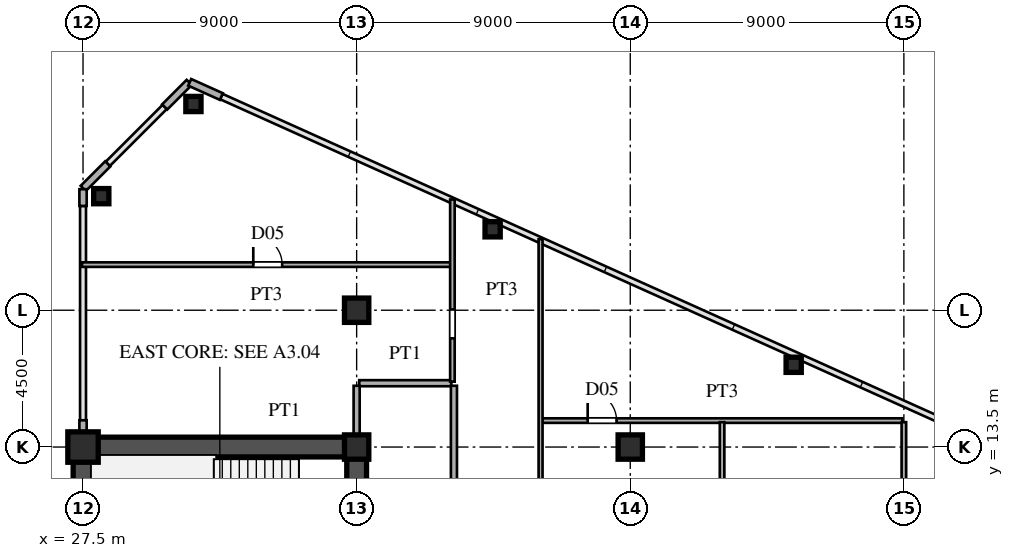
"""IFC4 building model, lengths in metres.
Left out: names, types, materials, properties, quantities, classifications, styles, units other than length and angle.
Written with IfcOpenShell. Run it as: python <this file> out.ifc"""

import sys

from ifc_helpers import new_model, si_unit, direction, frame, frame_2d, origin, origin_2d, place, context, subcontext, project, spatial, rectangle, hollow_rectangle, i_section, extrude, source, transform, mapped, element, fill, save


model = new_model("IFC4")
c1 = context("Model", 3, precision=1e-05, world=origin(), true_north=direction((0.0, 1.0)))
c2 = subcontext(c1, "Body", "Model", "MODEL_VIEW")
j1 = project(units=[si_unit("LENGTHUNIT", "METRE"), si_unit("PLANEANGLEUNIT", "RADIAN")], contexts=[c1])
p1 = place(None, origin())
s1 = spatial("IfcSite", under=j1, at=p1, CompositionType="ELEMENT")
p2 = place(p1, origin())
s2 = spatial("IfcBuilding", under=s1, at=p2, CompositionType="ELEMENT")
p3 = place(p2, frame((0.0, 0.0, 65.7)))
s3 = spatial("IfcBuildingStorey", under=s2, at=p3, CompositionType="ELEMENT", Elevation=65.7)
m1 = source(origin(), c2, "Body", "SweptSolid", [
    extrude(hollow_rectangle(XDim=1.0, YDim=1.0, WallThickness=0.042, at=origin_2d()), origin(), (0.0, 0.0, 1.0), 3.6),
])
p4 = place(p3, frame((27.5, 13.5, 0.0), z_axis=(0.0, 0.0, 1.0), x_axis=(1.0, 0.0, 0.0)))
e1 = element("IfcColumn", 1, at=p4, inside=s3, PredefinedType="COLUMN", context=c2, shape_type="MappedRepresentation", body=[
    mapped(m1, transform((0.0, 0.0, 0.0), scale=1.0)),
])
m2 = source(origin(), c2, "Body", "SweptSolid", [
    extrude(i_section(OverallWidth=0.8, OverallDepth=0.8, WebThickness=0.032, FlangeThickness=0.05, at=origin_2d()), origin(), (0.0, 0.0, 1.0), 3.6),
])
for number, where, z_axis, x_axis in (
    (2, (36.5, 13.5, 0.0), (0.0, 0.0, 1.0), (1.0, 0.0, 0.0)),
    (3, (36.5, 18.0, 0.0), (0.0, 0.0, 1.0), (1.0, 0.0, 0.0)),
    (4, (45.5, 13.5, 0.0), (0.0, 0.0, 1.0), (1.0, 0.0, 0.0)),
):
    element("IfcColumn", number, at=place(p3, frame(where, z_axis=z_axis, x_axis=x_axis)), inside=s3, PredefinedType="COLUMN", context=c2, shape_type="MappedRepresentation", body=[
        mapped(m2, transform((0.0, 0.0, 0.0), scale=1.0)),
    ])
m3 = source(origin(), c2, "Body", "SweptSolid", [
    extrude(hollow_rectangle(XDim=0.5, YDim=0.5, WallThickness=0.02, at=origin_2d()), origin(), (0.0, 0.0, 1.0), 3.6),
])
for number, where, z_axis, x_axis in (
    (5, (31.131, 24.783, 0.0), (0.0, 0.0, 1.0), (1.0, 0.0, 0.0)),
    (6, (28.1, 21.751, 0.0), (0.0, 0.0, 1.0), (1.0, 0.0, 0.0)),
    (7, (40.973, 20.661, 0.0), (0.0, 0.0, 1.0), (1.0, 0.0, 0.0)),
    (8, (50.875, 16.205, 0.0), (0.0, 0.0, 1.0), (1.0, 0.0, 0.0)),
):
    element("IfcColumn", number, at=place(p3, frame(where, z_axis=z_axis, x_axis=x_axis)), inside=s3, PredefinedType="COLUMN", context=c2, shape_type="MappedRepresentation", body=[
        mapped(m3, transform((0.0, 0.0, 0.0), scale=1.0)),
    ])
p5 = place(p3, frame((32.049, 25.028, 0.0), z_axis=(0.0, 0.0, 1.0), x_axis=(-0.911929519623, 0.410346866979, 0.0)))
e9 = element("IfcWall", 9, at=p5, inside=s3, PredefinedType="SOLIDWALL", context=c2, shape_type="SweptSolid", body=[
    extrude(rectangle(XDim=1.14, YDim=0.24, at=frame_2d((0.57, 0.0))), origin(), (0.0, 0.0, 1.0), 3.38),
])
for number, where, z_axis, x_axis in (
    (10, (30.993, 25.493, 0.0), (0.0, 0.0, 1.0), (-0.707, -0.707, 0.0)),
    (11, (28.313, 22.813, 0.0), (0.0, 0.0, 1.0), (-0.707, -0.707, 0.0)),
):
    element("IfcWall", number, at=place(p3, frame(where, z_axis=z_axis, x_axis=x_axis)), inside=s3, PredefinedType="SOLIDWALL", context=c2, shape_type="SweptSolid", body=[
        extrude(rectangle(XDim=1.14, YDim=0.24, at=frame_2d((0.57, 0.0))), origin(), (0.0, 0.0, 1.0), 3.38),
    ])
p6 = place(p3, frame((27.5, 13.83, 0.0), z_axis=(0.0, 0.0, 1.0), x_axis=(0.0, 1.0, 0.0)))
e12 = element("IfcWall", 12, at=p6, inside=s3, PredefinedType="SOLIDWALL", context=c2, shape_type="SweptSolid", body=[
    extrude(rectangle(XDim=0.55, YDim=0.24, at=frame_2d((0.275, 0.0))), origin(), (0.0, 0.0, 1.0), 2.88),
])
p7 = place(p3, frame((27.5, 21.43, 0.0), z_axis=(0.0, 0.0, 1.0), x_axis=(0.0, 1.0, 0.0)))
e13 = element("IfcWall", 13, at=p7, inside=s3, PredefinedType="SOLIDWALL", context=c2, shape_type="SweptSolid", body=[
    extrude(rectangle(XDim=0.55, YDim=0.24, at=frame_2d((0.275, 0.0))), origin(), (0.0, 0.0, 1.0), 3.38),
])
p8 = place(p3, frame((27.5, 1.3, 0.0), z_axis=(0.0, 0.0, 1.0), x_axis=(0.0, 1.0, 0.0)))
e14 = element("IfcWall", 14, at=p8, inside=s3, PredefinedType="SHEAR", context=c2, shape_type="SweptSolid", body=[
    extrude(rectangle(XDim=12.2, YDim=0.65, at=frame_2d((6.1, 0.0))), origin(), (0.0, 0.0, 1.0), 3.38),
])
p9 = place(p3, frame((27.5, 13.5, 0.0), z_axis=(0.0, 0.0, 1.0), x_axis=(1.0, 0.0, 0.0)))
e15 = element("IfcWall", 15, at=p9, inside=s3, PredefinedType="SHEAR", context=c2, shape_type="SweptSolid", body=[
    extrude(rectangle(XDim=9.0, YDim=0.65, at=frame_2d((4.5, 0.0))), origin(), (0.0, 0.0, 1.0), 3.38),
])
p10 = place(p3, frame((36.5, 8.2, 0.0), z_axis=(0.0, 0.0, 1.0), x_axis=(0.0, 1.0, 0.0)))
e16 = element("IfcWall", 16, at=p10, inside=s3, PredefinedType="SHEAR", context=c2, shape_type="SweptSolid", body=[
    extrude(rectangle(XDim=5.45, YDim=0.65, at=frame_2d((2.725, 0.0))), origin(), (0.0, 0.0, 1.0), 3.38),
])
p11 = place(p10, frame((0.245, 0.0, 0.0)))
e17 = element("IfcOpeningElement", 17, at=p11, cuts=e16, PredefinedType="OPENING", context=c2, shape_type="SweptSolid", body=[
    extrude(rectangle(XDim=0.95, YDim=2.15, at=frame_2d((0.475, 1.075))), frame((0.0, 0.335, 0.0), z_axis=(0.0, -1.0, 0.0), x_axis=(1.0, 0.0, 0.0)), (0.0, 0.0, 1.0), 0.67),
])
p12 = place(p3, frame((42.6, 14.37, 0.0), z_axis=(0.0, 0.0, 1.0), x_axis=(1.0, 0.0, 0.0)))
e18 = element("IfcWall", 18, at=p12, inside=s3, PredefinedType="PARTITIONING", context=c2, shape_type="SweptSolid", body=[
    extrude(rectangle(XDim=11.85, YDim=0.15, at=frame_2d((5.925, 0.0))), origin(), (0.0, 0.0, 1.0), 3.38),
])
p13 = place(p12, frame((1.5, 0.0, 0.0)))
e19 = element("IfcOpeningElement", 19, at=p13, cuts=e18, PredefinedType="OPENING", context=c2, shape_type="SweptSolid", body=[
    extrude(rectangle(XDim=0.95, YDim=2.15, at=frame_2d((0.475, 1.075))), frame((0.0, 0.085, 0.0), z_axis=(0.0, -1.0, 0.0), x_axis=(1.0, 0.0, 0.0)), (0.0, 0.0, 1.0), 0.17),
])
p14 = place(p3, frame((36.585, 15.6, 0.0), z_axis=(0.0, 0.0, 1.0), x_axis=(1.0, 0.0, 0.0)))
e20 = element("IfcWall", 20, at=p14, inside=s3, PredefinedType="PARTITIONING", context=c2, shape_type="SweptSolid", body=[
    extrude(rectangle(XDim=3.03, YDim=0.2, at=frame_2d((1.515, 0.0))), origin(), (0.0, 0.0, 1.0), 3.38),
])
p15 = place(p3, frame((27.465, 19.5, 0.0), z_axis=(0.0, 0.0, 1.0), x_axis=(1.0, 0.0, 0.0)))
e21 = element("IfcWall", 21, at=p15, inside=s3, PredefinedType="PARTITIONING", context=c2, shape_type="SweptSolid", body=[
    extrude(rectangle(XDim=12.135, YDim=0.15, at=frame_2d((6.067, 0.0))), origin(), (0.0, 0.0, 1.0), 3.38),
])
p16 = place(p15, frame((5.635, 0.0, 0.0)))
e22 = element("IfcOpeningElement", 22, at=p16, cuts=e21, PredefinedType="OPENING", context=c2, shape_type="SweptSolid", body=[
    extrude(rectangle(XDim=0.95, YDim=2.15, at=frame_2d((0.475, 1.075))), frame((0.0, 0.085, 0.0), z_axis=(0.0, -1.0, 0.0), x_axis=(1.0, 0.0, 0.0)), (0.0, 0.0, 1.0), 0.17),
])
p17 = place(p3, frame((36.5, 13.83, 0.0), z_axis=(0.0, 0.0, 1.0), x_axis=(0.0, 1.0, 0.0)))
e23 = element("IfcWall", 23, at=p17, inside=s3, PredefinedType="PARTITIONING", context=c2, shape_type="SweptSolid", body=[
    extrude(rectangle(XDim=1.685, YDim=0.2, at=frame_2d((0.842, 0.0))), origin(), (0.0, 0.0, 1.0), 2.68),
])
p18 = place(p3, frame((39.65, 15.65, 0.0), z_axis=(0.0, 0.0, 1.0), x_axis=(0.0, 1.0, 0.0)))
e24 = element("IfcWall", 24, at=p18, inside=s3, PredefinedType="PARTITIONING", context=c2, shape_type="SweptSolid", body=[
    extrude(rectangle(XDim=5.992, YDim=0.15, at=frame_2d((2.996, 0.0))), origin(), (0.0, 0.0, 1.0), 3.38),
])
p19 = place(p18, frame((1.425, 0.0, 0.0)))
e25 = element("IfcOpeningElement", 25, at=p19, cuts=e24, PredefinedType="OPENING", context=c2, shape_type="SweptSolid", body=[
    extrude(rectangle(XDim=0.95, YDim=2.15, at=frame_2d((0.475, 1.075))), frame((0.0, 0.085, 0.0), z_axis=(0.0, -1.0, 0.0), x_axis=(1.0, 0.0, 0.0)), (0.0, 0.0, 1.0), 0.17),
])
p20 = place(p3, frame((39.7, -15.515, 0.0), z_axis=(0.0, 0.0, 1.0), x_axis=(0.0, 1.0, 0.0)))
e26 = element("IfcWall", 26, at=p20, inside=s3, PredefinedType="PARTITIONING", context=c2, shape_type="SweptSolid", body=[
    extrude(rectangle(XDim=31.03, YDim=0.2, at=frame_2d((15.515, 0.0))), origin(), (0.0, 0.0, 1.0), 3.38),
])
p21 = place(p20, frame((0.16, 0.0, 0.0)))
e27 = element("IfcOpeningElement", 27, at=p21, cuts=e26, PredefinedType="OPENING", context=c2, shape_type="SweptSolid", body=[
    extrude(rectangle(XDim=1.05, YDim=2.25, at=frame_2d((0.525, 1.125))), frame((0.0, 0.11, 0.0), z_axis=(0.0, -1.0, 0.0), x_axis=(1.0, 0.0, 0.0)), (0.0, 0.0, 1.0), 0.22),
])
p22 = place(p20, frame((10.28, 0.0, 0.0)))
e28 = element("IfcOpeningElement", 28, at=p22, cuts=e26, PredefinedType="OPENING", context=c2, shape_type="SweptSolid", body=[
    extrude(rectangle(XDim=1.05, YDim=2.25, at=frame_2d((0.525, 1.125))), frame((0.0, 0.11, 0.0), z_axis=(0.0, -1.0, 0.0), x_axis=(1.0, 0.0, 0.0)), (0.0, 0.0, 1.0), 0.22),
])
p23 = place(p20, frame((24.067, 0.0, 0.0)))
e29 = element("IfcOpeningElement", 29, at=p23, cuts=e26, PredefinedType="OPENING", context=c2, shape_type="SweptSolid", body=[
    extrude(rectangle(XDim=1.05, YDim=2.25, at=frame_2d((0.525, 1.125))), frame((0.0, 0.11, 0.0), z_axis=(0.0, -1.0, 0.0), x_axis=(1.0, 0.0, 0.0)), (0.0, 0.0, 1.0), 0.22),
])
p24 = place(p3, frame((42.55, -1.648, 0.0), z_axis=(0.0, 0.0, 1.0), x_axis=(0.0, 1.0, 0.0)))
e30 = element("IfcWall", 30, at=p24, inside=s3, PredefinedType="PARTITIONING", context=c2, shape_type="SweptSolid", body=[
    extrude(rectangle(XDim=21.985, YDim=0.13, at=frame_2d((10.992, 0.0))), origin(), (0.0, 0.0, 1.0), 3.38),
])
p25 = place(p24, frame((10.679, 0.0, 0.0)))
e31 = element("IfcOpeningElement", 31, at=p25, cuts=e30, PredefinedType="OPENING", context=c2, shape_type="SweptSolid", body=[
    extrude(rectangle(XDim=0.95, YDim=2.15, at=frame_2d((0.475, 1.075))), frame((0.0, 0.075, 0.0), z_axis=(0.0, -1.0, 0.0), x_axis=(1.0, 0.0, 0.0)), (0.0, 0.0, 1.0), 0.15),
])
p26 = place(p3, frame((48.52, 2.55, 0.0), z_axis=(0.0, 0.0, 1.0), x_axis=(0.0, 1.0, 0.0)))
e32 = element("IfcWall", 32, at=p26, inside=s3, PredefinedType="PARTITIONING", context=c2, shape_type="SweptSolid", body=[
    extrude(rectangle(XDim=11.768, YDim=0.15, at=frame_2d((5.884, 0.0))), origin(), (0.0, 0.0, 1.0), 3.38),
])
p27 = place(p26, frame((8.376, 0.0, 0.0)))
e33 = element("IfcOpeningElement", 33, at=p27, cuts=e32, PredefinedType="OPENING", context=c2, shape_type="SweptSolid", body=[
    extrude(rectangle(XDim=0.95, YDim=2.15, at=frame_2d((0.475, 1.075))), frame((0.0, 0.085, 0.0), z_axis=(0.0, -1.0, 0.0), x_axis=(1.0, 0.0, 0.0)), (0.0, 0.0, 1.0), 0.17),
])
p28 = place(p26, frame((2.442, 0.0, 0.0)))
e34 = element("IfcOpeningElement", 34, at=p28, cuts=e32, PredefinedType="OPENING", context=c2, shape_type="SweptSolid", body=[
    extrude(rectangle(XDim=0.95, YDim=2.15, at=frame_2d((0.475, 1.075))), frame((0.0, 0.085, 0.0), z_axis=(0.0, -1.0, 0.0), x_axis=(1.0, 0.0, 0.0)), (0.0, 0.0, 1.0), 0.17),
])
p29 = place(p3, frame((54.5, -14.96, 0.0), z_axis=(0.0, 0.0, 1.0), x_axis=(0.0, 1.0, 0.0)))
e35 = element("IfcWall", 35, at=p29, inside=s3, PredefinedType="PARTITIONING", context=c2, shape_type="SweptSolid", body=[
    extrude(rectangle(XDim=29.278, YDim=0.15, at=frame_2d((14.639, 0.0))), origin(), (0.0, 0.0, 1.0), 2.68),
])
p30 = place(p29, frame((1.272, 0.0, 0.0)))
e36 = element("IfcOpeningElement", 36, at=p30, cuts=e35, PredefinedType="OPENING", context=c2, shape_type="SweptSolid", body=[
    extrude(rectangle(XDim=0.95, YDim=2.15, at=frame_2d((0.475, 1.075))), frame((0.0, 0.085, 0.0), z_axis=(0.0, -1.0, 0.0), x_axis=(1.0, 0.0, 0.0)), (0.0, 0.0, 1.0), 0.17),
])
p31 = place(p29, frame((10.94, 0.0, 0.0)))
e37 = element("IfcOpeningElement", 37, at=p31, cuts=e35, PredefinedType="OPENING", context=c2, shape_type="SweptSolid", body=[
    extrude(rectangle(XDim=0.95, YDim=2.15, at=frame_2d((0.475, 1.075))), frame((0.0, 0.085, 0.0), z_axis=(0.0, -1.0, 0.0), x_axis=(1.0, 0.0, 0.0)), (0.0, 0.0, 1.0), 0.17),
])
p32 = place(p29, frame((25.886, 0.0, 0.0)))
e38 = element("IfcOpeningElement", 38, at=p32, cuts=e35, PredefinedType="OPENING", context=c2, shape_type="SweptSolid", body=[
    extrude(rectangle(XDim=0.95, YDim=2.15, at=frame_2d((0.475, 1.075))), frame((0.0, 0.085, 0.0), z_axis=(0.0, -1.0, 0.0), x_axis=(1.0, 0.0, 0.0)), (0.0, 0.0, 1.0), 0.17),
])
p33 = place(p29, frame((19.952, 0.0, 0.0)))
e39 = element("IfcOpeningElement", 39, at=p33, cuts=e35, PredefinedType="OPENING", context=c2, shape_type="SweptSolid", body=[
    extrude(rectangle(XDim=0.95, YDim=2.15, at=frame_2d((0.475, 1.075))), frame((0.0, 0.085, 0.0), z_axis=(0.0, -1.0, 0.0), x_axis=(1.0, 0.0, 0.0)), (0.0, 0.0, 1.0), 0.17),
])
m4 = source(origin(), c2, "Body", "SweptSolid", [
    extrude(rectangle(XDim=0.95, YDim=2.15, at=frame_2d((0.475, 1.075))), frame((0.0, 0.025, 0.0), z_axis=(0.0, -1.0, 0.0), x_axis=(1.0, 0.0, 0.0)), (0.0, 0.0, 1.0), 0.05),
])
p34 = place(p13, origin())
e40 = element("IfcDoor", 40, at=p34, inside=s3, OperationType="SINGLE_SWING_LEFT", PredefinedType="DOOR", context=c2, shape_type="MappedRepresentation", body=[
    mapped(m4, transform((0.0, 0.0, 0.0), scale=1.0)),
])
fill(e19, e40)
p35 = place(p16, origin())
e41 = element("IfcDoor", 41, at=p35, inside=s3, OperationType="SINGLE_SWING_LEFT", PredefinedType="DOOR", context=c2, shape_type="MappedRepresentation", body=[
    mapped(m4, transform((0.0, 0.0, 0.0), scale=1.0)),
])
fill(e22, e41)
save(model, sys.argv[1])
